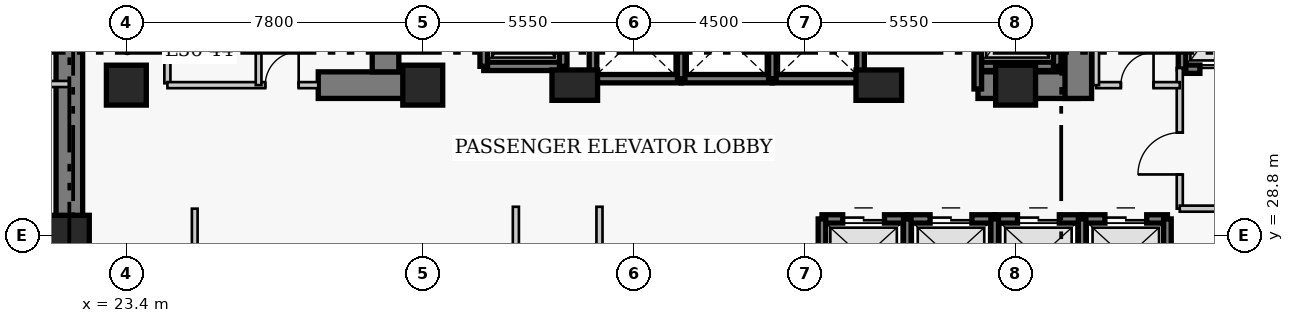
"""IFC4 building model, lengths in metres.
Left out: names, types, materials, properties, quantities, classifications, styles, units other than length and angle.
Written with IfcOpenShell. Run it as: python <this file> out.ifc"""

import sys

from ifc_helpers import new_model, si_unit, direction, frame, frame_2d, origin, origin_2d, place, context, subcontext, project, spatial, rectangle, extrude, element, fill, save


model = new_model("IFC4")
c1 = context("Model", 3, precision=1e-05, world=origin(), true_north=direction((0.0, 1.0)))
c2 = subcontext(c1, "Body", "Model", "MODEL_VIEW")
j1 = project(units=[si_unit("LENGTHUNIT", "METRE"), si_unit("PLANEANGLEUNIT", "RADIAN")], contexts=[c1])
p1 = place(None, origin())
s1 = spatial("IfcSite", under=j1, at=p1, CompositionType="ELEMENT")
p2 = place(p1, origin())
s2 = spatial("IfcBuilding", under=s1, at=p2, CompositionType="ELEMENT")
p3 = place(p2, frame((0.0, 0.0, 146.0)))
s3 = spatial("IfcBuildingStorey", under=s2, at=p3, CompositionType="ELEMENT", Elevation=146.0)
p4 = place(p3, frame((21.9, 27.05, 0.0), z_axis=(0.0, 0.0, 1.0), x_axis=(0.0, 1.0, 0.0)))
e1 = element("IfcWall", 1, at=p4, inside=s3, PredefinedType="SHEAR", context=c2, shape_type="SweptSolid", body=[
    extrude(rectangle(XDim=13.62, YDim=0.7, at=frame_2d((6.81, 0.0))), origin(), (0.0, 0.0, 1.0), 3.8),
])
p5 = place(p3, frame((28.45, 32.75, 0.0), z_axis=(0.0, 0.0, 1.0), x_axis=(1.0, 0.0, 0.0)))
e2 = element("IfcWall", 2, at=p5, inside=s3, PredefinedType="SHEAR", context=c2, shape_type="SweptSolid", body=[
    extrude(rectangle(XDim=2.4, YDim=0.7, at=frame_2d((1.2, 0.0))), origin(), (0.0, 0.0, 1.0), 3.8),
])
p6 = place(p3, frame((45.81, 32.75, 0.0), z_axis=(0.0, 0.0, 1.0), x_axis=(1.0, 0.0, 0.0)))
e3 = element("IfcWall", 3, at=p6, inside=s3, PredefinedType="SHEAR", context=c2, shape_type="SweptSolid", body=[
    extrude(rectangle(XDim=2.64, YDim=0.7, at=frame_2d((1.32, 0.0))), origin(), (0.0, 0.0, 1.0), 3.8),
])
p7 = place(p3, frame((30.22, 33.1, 0.0), z_axis=(0.0, 0.0, 1.0), x_axis=(0.0, 1.0, 0.0)))
e4 = element("IfcWall", 4, at=p7, inside=s3, PredefinedType="SHEAR", context=c2, shape_type="SweptSolid", body=[
    extrude(rectangle(XDim=7.22, YDim=0.7, at=frame_2d((3.61, 0.0))), origin(), (0.0, 0.0, 1.0), 3.8),
])
p8 = place(p3, frame((48.45, 32.4, 0.0), z_axis=(0.0, 0.0, 1.0), x_axis=(0.0, 1.0, 0.0)))
e5 = element("IfcWall", 5, at=p8, inside=s3, PredefinedType="SHEAR", context=c2, shape_type="SweptSolid", body=[
    extrude(rectangle(XDim=7.92, YDim=0.7, at=frame_2d((3.96, 0.0))), origin(), (0.0, 0.0, 1.0), 3.8),
])
p9 = place(p8, frame((5.8, 0.0, 0.0)))
e6 = element("IfcOpeningElement", 6, at=p9, cuts=e5, PredefinedType="OPENING", context=c2, shape_type="SweptSolid", body=[
    extrude(rectangle(XDim=1.1, YDim=2.15, at=frame_2d((0.55, 1.075))), frame((0.0, 0.36, 0.0), z_axis=(0.0, -1.0, 0.0), x_axis=(1.0, 0.0, 0.0)), (0.0, 0.0, 1.0), 0.72),
])
for number, where, z_axis, x_axis in (
    (7, (21.9, 28.8, 0.0), (0.0, 0.0, 1.0), (1.0, 0.0, 0.0)),
    (8, (23.4, 32.75, 0.0), (0.0, 0.0, 1.0), (1.0, 0.0, 0.0)),
    (9, (31.2, 32.75, 0.0), (0.0, 0.0, 1.0), (1.0, 0.0, 0.0)),
):
    element("IfcColumn", number, at=place(p3, frame(where, z_axis=z_axis, x_axis=x_axis)), inside=s3, PredefinedType="COLUMN", context=c2, shape_type="SweptSolid", body=[
        extrude(rectangle(XDim=1.05, YDim=1.05, at=origin_2d()), origin(), (0.0, 0.0, 1.0), 3.8),
    ])
for number, where, z_axis, x_axis in (
    (10, (35.2, 32.75, 0.0), (0.0, 0.0, 1.0), (1.0, 0.0, 0.0)),
    (11, (43.2, 32.75, 0.0), (0.0, 0.0, 1.0), (1.0, 0.0, 0.0)),
):
    element("IfcColumn", number, at=place(p3, frame(where, z_axis=z_axis, x_axis=x_axis)), inside=s3, PredefinedType="COLUMN", context=c2, shape_type="SweptSolid", body=[
        extrude(rectangle(XDim=1.2, YDim=0.8, at=origin_2d()), origin(), (0.0, 0.0, 1.0), 3.8),
    ])
p10 = place(p3, frame((46.8, 32.75, 0.0), z_axis=(0.0, 0.0, 1.0), x_axis=(1.0, 0.0, 0.0)))
e12 = element("IfcColumn", 12, at=p10, inside=s3, PredefinedType="COLUMN", context=c2, shape_type="SweptSolid", body=[
    extrude(rectangle(XDim=1.05, YDim=1.05, at=origin_2d()), origin(), (0.0, 0.0, 1.0), 3.8),
])
p11 = place(p3, frame((41.705, 29.23, 0.0), z_axis=(0.0, 0.0, 1.0), x_axis=(1.0, 0.0, 0.0)))
e13 = element("IfcWall", 13, at=p11, inside=s3, PredefinedType="SHEAR", context=c2, shape_type="SweptSolid", body=[
    extrude(rectangle(XDim=2.245, YDim=0.22, at=frame_2d((1.123, 0.0))), origin(), (0.0, 0.0, 1.0), 3.8),
])
p12 = place(p11, frame((0.545, 0.0, 0.0)))
e14 = element("IfcOpeningElement", 14, at=p12, cuts=e13, PredefinedType="OPENING", context=c2, shape_type="SweptSolid", body=[
    extrude(rectangle(XDim=1.1, YDim=2.15, at=frame_2d((0.55, 1.075))), frame((0.0, 0.12, 0.0), z_axis=(0.0, -1.0, 0.0), x_axis=(1.0, 0.0, 0.0)), (0.0, 0.0, 1.0), 0.24),
])
p13 = place(p3, frame((41.705, 27.17, 0.0), z_axis=(0.0, 0.0, 1.0), x_axis=(0.0, 1.0, 0.0)))
e15 = element("IfcWall", 15, at=p13, inside=s3, PredefinedType="SHEAR", context=c2, shape_type="SweptSolid", body=[
    extrude(rectangle(XDim=2.06, YDim=0.2, at=frame_2d((1.03, 0.0))), origin(), (0.0, 0.0, 1.0), 3.8),
])
p14 = place(p3, frame((43.95, 29.23, 0.0), z_axis=(0.0, 0.0, 1.0), x_axis=(1.0, 0.0, 0.0)))
e16 = element("IfcWall", 16, at=p14, inside=s3, PredefinedType="SHEAR", context=c2, shape_type="SweptSolid", body=[
    extrude(rectangle(XDim=2.3, YDim=0.22, at=frame_2d((1.15, 0.0))), origin(), (0.0, 0.0, 1.0), 3.8),
])
p15 = place(p14, frame((0.6, 0.0, 0.0)))
e17 = element("IfcOpeningElement", 17, at=p15, cuts=e16, PredefinedType="OPENING", context=c2, shape_type="SweptSolid", body=[
    extrude(rectangle(XDim=1.1, YDim=2.15, at=frame_2d((0.55, 1.075))), frame((0.0, 0.12, 0.0), z_axis=(0.0, -1.0, 0.0), x_axis=(1.0, 0.0, 0.0)), (0.0, 0.0, 1.0), 0.24),
])
p16 = place(p3, frame((43.95, 27.17, 0.0), z_axis=(0.0, 0.0, 1.0), x_axis=(0.0, 1.0, 0.0)))
e18 = element("IfcWall", 18, at=p16, inside=s3, PredefinedType="SHEAR", context=c2, shape_type="SweptSolid", body=[
    extrude(rectangle(XDim=2.06, YDim=0.2, at=frame_2d((1.03, 0.0))), origin(), (0.0, 0.0, 1.0), 3.8),
])
p17 = place(p3, frame((46.25, 29.23, 0.0), z_axis=(0.0, 0.0, 1.0), x_axis=(1.0, 0.0, 0.0)))
e19 = element("IfcWall", 19, at=p17, inside=s3, PredefinedType="SHEAR", context=c2, shape_type="SweptSolid", body=[
    extrude(rectangle(XDim=2.3, YDim=0.22, at=frame_2d((1.15, 0.0))), origin(), (0.0, 0.0, 1.0), 3.8),
])
p18 = place(p17, frame((0.6, 0.0, 0.0)))
e20 = element("IfcOpeningElement", 20, at=p18, cuts=e19, PredefinedType="OPENING", context=c2, shape_type="SweptSolid", body=[
    extrude(rectangle(XDim=1.1, YDim=2.15, at=frame_2d((0.55, 1.075))), frame((0.0, 0.12, 0.0), z_axis=(0.0, -1.0, 0.0), x_axis=(1.0, 0.0, 0.0)), (0.0, 0.0, 1.0), 0.24),
])
p19 = place(p3, frame((46.25, 27.17, 0.0), z_axis=(0.0, 0.0, 1.0), x_axis=(0.0, 1.0, 0.0)))
e21 = element("IfcWall", 21, at=p19, inside=s3, PredefinedType="SHEAR", context=c2, shape_type="SweptSolid", body=[
    extrude(rectangle(XDim=2.06, YDim=0.2, at=frame_2d((1.03, 0.0))), origin(), (0.0, 0.0, 1.0), 3.8),
])
p20 = place(p3, frame((48.55, 29.23, 0.0), z_axis=(0.0, 0.0, 1.0), x_axis=(1.0, 0.0, 0.0)))
e22 = element("IfcWall", 22, at=p20, inside=s3, PredefinedType="SHEAR", context=c2, shape_type="SweptSolid", body=[
    extrude(rectangle(XDim=2.245, YDim=0.22, at=frame_2d((1.123, 0.0))), origin(), (0.0, 0.0, 1.0), 3.8),
])
p21 = place(p20, frame((0.6, 0.0, 0.0)))
e23 = element("IfcOpeningElement", 23, at=p21, cuts=e22, PredefinedType="OPENING", context=c2, shape_type="SweptSolid", body=[
    extrude(rectangle(XDim=1.1, YDim=2.15, at=frame_2d((0.55, 1.075))), frame((0.0, 0.12, 0.0), z_axis=(0.0, -1.0, 0.0), x_axis=(1.0, 0.0, 0.0)), (0.0, 0.0, 1.0), 0.24),
])
for number, where, z_axis, x_axis in (
    (24, (48.55, 27.17, 0.0), (0.0, 0.0, 1.0), (0.0, 1.0, 0.0)),
    (25, (50.795, 27.17, 0.0), (0.0, 0.0, 1.0), (0.0, 1.0, 0.0)),
):
    element("IfcWall", number, at=place(p3, frame(where, z_axis=z_axis, x_axis=x_axis)), inside=s3, PredefinedType="SHEAR", context=c2, shape_type="SweptSolid", body=[
        extrude(rectangle(XDim=2.06, YDim=0.2, at=frame_2d((1.03, 0.0))), origin(), (0.0, 0.0, 1.0), 3.8),
    ])
p22 = place(p3, frame((35.68, 32.92, 0.0), z_axis=(0.0, 0.0, 1.0), x_axis=(1.0, 0.0, 0.0)))
e26 = element("IfcWall", 26, at=p22, inside=s3, PredefinedType="SHEAR", context=c2, shape_type="SweptSolid", body=[
    extrude(rectangle(XDim=2.32, YDim=0.22, at=frame_2d((1.16, 0.0))), origin(), (0.0, 0.0, 1.0), 3.8),
])
p23 = place(p3, frame((35.68, 32.92, 0.0), z_axis=(0.0, 0.0, 1.0), x_axis=(0.0, 1.0, 0.0)))
e27 = element("IfcWall", 27, at=p23, inside=s3, PredefinedType="SHEAR", context=c2, shape_type="SweptSolid", body=[
    extrude(rectangle(XDim=2.16, YDim=0.2, at=frame_2d((1.08, 0.0))), origin(), (0.0, 0.0, 1.0), 3.8),
])
p24 = place(p3, frame((38.0, 32.92, 0.0), z_axis=(0.0, 0.0, 1.0), x_axis=(1.0, 0.0, 0.0)))
e28 = element("IfcWall", 28, at=p24, inside=s3, PredefinedType="SHEAR", context=c2, shape_type="SweptSolid", body=[
    extrude(rectangle(XDim=2.4, YDim=0.22, at=frame_2d((1.2, 0.0))), origin(), (0.0, 0.0, 1.0), 3.8),
])
p25 = place(p3, frame((38.0, 32.92, 0.0), z_axis=(0.0, 0.0, 1.0), x_axis=(0.0, 1.0, 0.0)))
e29 = element("IfcWall", 29, at=p25, inside=s3, PredefinedType="SHEAR", context=c2, shape_type="SweptSolid", body=[
    extrude(rectangle(XDim=2.16, YDim=0.2, at=frame_2d((1.08, 0.0))), origin(), (0.0, 0.0, 1.0), 3.8),
])
p26 = place(p3, frame((40.4, 32.92, 0.0), z_axis=(0.0, 0.0, 1.0), x_axis=(1.0, 0.0, 0.0)))
e30 = element("IfcWall", 30, at=p26, inside=s3, PredefinedType="SHEAR", context=c2, shape_type="SweptSolid", body=[
    extrude(rectangle(XDim=2.32, YDim=0.22, at=frame_2d((1.16, 0.0))), origin(), (0.0, 0.0, 1.0), 3.8),
])
for number, where, z_axis, x_axis in (
    (31, (40.4, 32.92, 0.0), (0.0, 0.0, 1.0), (0.0, 1.0, 0.0)),
    (32, (42.72, 32.92, 0.0), (0.0, 0.0, 1.0), (0.0, 1.0, 0.0)),
):
    element("IfcWall", number, at=place(p3, frame(where, z_axis=z_axis, x_axis=x_axis)), inside=s3, PredefinedType="SHEAR", context=c2, shape_type="SweptSolid", body=[
        extrude(rectangle(XDim=2.16, YDim=0.2, at=frame_2d((1.08, 0.0))), origin(), (0.0, 0.0, 1.0), 3.8),
    ])
p27 = place(p3, frame((51.18, 33.17, 0.0), z_axis=(0.0, 0.0, 1.0), x_axis=(1.0, 0.0, 0.0)))
e33 = element("IfcWall", 33, at=p27, inside=s3, PredefinedType="SHEAR", context=c2, shape_type="SweptSolid", body=[
    extrude(rectangle(XDim=2.42, YDim=0.22, at=frame_2d((1.21, 0.0))), origin(), (0.0, 0.0, 1.0), 3.8),
])
p28 = place(p27, frame((0.47, 0.0, 0.0)))
e34 = element("IfcOpeningElement", 34, at=p28, cuts=e33, PredefinedType="OPENING", context=c2, shape_type="SweptSolid", body=[
    extrude(rectangle(XDim=1.3, YDim=2.15, at=frame_2d((0.65, 1.075))), frame((0.0, 0.12, 0.0), z_axis=(0.0, -1.0, 0.0), x_axis=(1.0, 0.0, 0.0)), (0.0, 0.0, 1.0), 0.24),
])
p29 = place(p3, frame((51.18, 33.17, 0.0), z_axis=(0.0, 0.0, 1.0), x_axis=(0.0, 1.0, 0.0)))
e35 = element("IfcWall", 35, at=p29, inside=s3, PredefinedType="SHEAR", context=c2, shape_type="SweptSolid", body=[
    extrude(rectangle(XDim=2.86, YDim=0.2, at=frame_2d((1.43, 0.0))), origin(), (0.0, 0.0, 1.0), 3.8),
])
p30 = place(p3, frame((32.805, 33.245, 0.0), z_axis=(0.0, 0.0, 1.0), x_axis=(1.0, 0.0, 0.0)))
e36 = element("IfcWall", 36, at=p30, inside=s3, PredefinedType="SHEAR", context=c2, shape_type="SweptSolid", body=[
    extrude(rectangle(XDim=2.09, YDim=0.22, at=frame_2d((1.045, 0.0))), origin(), (0.0, 0.0, 1.0), 3.8),
])
for number, where, z_axis, x_axis in (
    (37, (32.805, 33.245, 0.0), (0.0, 0.0, 1.0), (0.0, 1.0, 0.0)),
    (38, (34.895, 33.245, 0.0), (0.0, 0.0, 1.0), (0.0, 1.0, 0.0)),
):
    element("IfcWall", number, at=place(p3, frame(where, z_axis=z_axis, x_axis=x_axis)), inside=s3, PredefinedType="SHEAR", context=c2, shape_type="SweptSolid", body=[
        extrude(rectangle(XDim=2.91, YDim=0.2, at=frame_2d((1.455, 0.0))), origin(), (0.0, 0.0, 1.0), 3.8),
    ])
p31 = place(p3, frame((45.805, 33.245, 0.0), z_axis=(0.0, 0.0, 1.0), x_axis=(1.0, 0.0, 0.0)))
e39 = element("IfcWall", 39, at=p31, inside=s3, PredefinedType="SHEAR", context=c2, shape_type="SweptSolid", body=[
    extrude(rectangle(XDim=2.09, YDim=0.22, at=frame_2d((1.045, 0.0))), origin(), (0.0, 0.0, 1.0), 3.8),
])
p32 = place(p3, frame((45.805, 32.65, 0.0), z_axis=(0.0, 0.0, 1.0), x_axis=(0.0, 1.0, 0.0)))
e40 = element("IfcWall", 40, at=p32, inside=s3, PredefinedType="SHEAR", context=c2, shape_type="SweptSolid", body=[
    extrude(rectangle(XDim=3.505, YDim=0.2, at=frame_2d((1.752, 0.0))), origin(), (0.0, 0.0, 1.0), 3.8),
])
p33 = place(p3, frame((47.895, 33.245, 0.0), z_axis=(0.0, 0.0, 1.0), x_axis=(0.0, 1.0, 0.0)))
e41 = element("IfcWall", 41, at=p33, inside=s3, PredefinedType="SHEAR", context=c2, shape_type="SweptSolid", body=[
    extrude(rectangle(XDim=2.91, YDim=0.2, at=frame_2d((1.455, 0.0))), origin(), (0.0, 0.0, 1.0), 3.8),
])
p34 = place(p3, frame((24.48, 32.8, 0.0), z_axis=(0.0, 0.0, 1.0), x_axis=(0.0, 1.0, 0.0)))
e42 = element("IfcWall", 42, at=p34, inside=s3, PredefinedType="PARTITIONING", context=c2, shape_type="SweptSolid", body=[
    extrude(rectangle(XDim=3.57, YDim=0.16, at=frame_2d((1.785, 0.0))), origin(), (0.0, 0.0, 1.0), 3.55),
])
p35 = place(p34, frame((1.604, 0.0, 0.0)))
e43 = element("IfcOpeningElement", 43, at=p35, cuts=e42, PredefinedType="OPENING", context=c2, shape_type="SweptSolid", body=[
    extrude(rectangle(XDim=0.9, YDim=2.1, at=frame_2d((0.45, 1.05))), frame((0.0, 0.09, 0.0), z_axis=(0.0, -1.0, 0.0), x_axis=(1.0, 0.0, 0.0)), (0.0, 0.0, 1.0), 0.18),
])
p36 = place(p3, frame((51.12, 29.5, 0.0), z_axis=(0.0, 0.0, 1.0), x_axis=(0.0, 1.0, 0.0)))
e44 = element("IfcWall", 44, at=p36, inside=s3, PredefinedType="PARTITIONING", context=c2, shape_type="SweptSolid", body=[
    extrude(rectangle(XDim=3.7, YDim=0.16, at=frame_2d((1.85, 0.0))), origin(), (0.0, 0.0, 1.0), 3.55),
])
p37 = place(p36, frame((0.9, 0.0, 0.0)))
e45 = element("IfcOpeningElement", 45, at=p37, cuts=e44, PredefinedType="OPENING", context=c2, shape_type="SweptSolid", body=[
    extrude(rectangle(XDim=1.1, YDim=2.15, at=frame_2d((0.55, 1.075))), frame((0.0, 0.09, 0.0), z_axis=(0.0, -1.0, 0.0), x_axis=(1.0, 0.0, 0.0)), (0.0, 0.0, 1.0), 0.18),
])
p38 = place(p3, frame((51.12, 29.5, 0.0), z_axis=(0.0, 0.0, 1.0), x_axis=(1.0, 0.0, 0.0)))
e46 = element("IfcWall", 46, at=p38, inside=s3, PredefinedType="PARTITIONING", context=c2, shape_type="SweptSolid", body=[
    extrude(rectangle(XDim=5.63, YDim=0.16, at=frame_2d((2.815, 0.0))), origin(), (0.0, 0.0, 1.0), 3.55),
])
p39 = place(p3, frame((24.48, 32.75, 0.0), z_axis=(0.0, 0.0, 1.0), x_axis=(1.0, 0.0, 0.0)))
e47 = element("IfcWall", 47, at=p39, inside=s3, PredefinedType="PARTITIONING", context=c2, shape_type="SweptSolid", body=[
    extrude(rectangle(XDim=3.97, YDim=0.16, at=frame_2d((1.985, 0.0))), origin(), (0.0, 0.0, 1.0), 3.55),
])
p40 = place(p39, frame((2.575, 0.0, 0.0)))
e48 = element("IfcOpeningElement", 48, at=p40, cuts=e47, PredefinedType="OPENING", context=c2, shape_type="SweptSolid", body=[
    extrude(rectangle(XDim=0.88, YDim=2.05, at=frame_2d((0.44, 1.025))), frame((0.0, 0.09, 0.0), z_axis=(0.0, -1.0, 0.0), x_axis=(1.0, 0.0, 0.0)), (0.0, 0.0, 1.0), 0.18),
])
p41 = place(p3, frame((48.92, 32.75, 0.0), z_axis=(0.0, 0.0, 1.0), x_axis=(1.0, 0.0, 0.0)))
e49 = element("IfcWall", 49, at=p41, inside=s3, PredefinedType="PARTITIONING", context=c2, shape_type="SweptSolid", body=[
    extrude(rectangle(XDim=2.2, YDim=0.16, at=frame_2d((1.1, 0.0))), origin(), (0.0, 0.0, 1.0), 3.55),
])
p42 = place(p41, frame((0.65, 0.0, 0.0)))
e50 = element("IfcOpeningElement", 50, at=p42, cuts=e49, PredefinedType="OPENING", context=c2, shape_type="SweptSolid", body=[
    extrude(rectangle(XDim=0.86, YDim=2.05, at=frame_2d((0.43, 1.025))), frame((0.0, 0.09, 0.0), z_axis=(0.0, -1.0, 0.0), x_axis=(1.0, 0.0, 0.0)), (0.0, 0.0, 1.0), 0.18),
])
for number, where, z_axis, x_axis in (
    (51, (48.92, 32.75, 0.0), (0.0, 0.0, 1.0), (0.0, 1.0, 0.0)),
    (52, (26.88, 32.75, 0.0), (0.0, 0.0, 1.0), (0.0, 1.0, 0.0)),
):
    element("IfcWall", number, at=place(p3, frame(where, z_axis=z_axis, x_axis=x_axis)), inside=s3, PredefinedType="PARTITIONING", context=c2, shape_type="SweptSolid", body=[
        extrude(rectangle(XDim=3.62, YDim=0.15, at=frame_2d((1.81, 0.0))), origin(), (0.0, 0.0, 1.0), 3.55),
    ])
for number, where, z_axis, x_axis in (
    (53, (33.65, 19.01, 0.0), (0.0, 0.0, 1.0), (0.0, 1.0, 0.0)),
    (54, (35.85, 19.01, 0.0), (0.0, 0.0, 1.0), (0.0, 1.0, 0.0)),
):
    element("IfcWall", number, at=place(p3, frame(where, z_axis=z_axis, x_axis=x_axis)), inside=s3, PredefinedType="PARTITIONING", context=c2, shape_type="SweptSolid", body=[
        extrude(rectangle(XDim=10.54, YDim=0.16, at=frame_2d((5.27, 0.0))), origin(), (0.0, 0.0, 1.0), 3.55),
    ])
p43 = place(p3, frame((19.16, 32.78, 0.0), z_axis=(0.0, 0.0, 1.0), x_axis=(1.0, 0.0, 0.0)))
e55 = element("IfcWall", 55, at=p43, inside=s3, PredefinedType="PARTITIONING", context=c2, shape_type="SweptSolid", body=[
    extrude(rectangle(XDim=2.74, YDim=0.16, at=frame_2d((1.37, 0.0))), origin(), (0.0, 0.0, 1.0), 3.55),
])
p44 = place(p3, frame((25.2, 19.01, 0.0), z_axis=(0.0, 0.0, 1.0), x_axis=(0.0, 1.0, 0.0)))
e56 = element("IfcWall", 56, at=p44, inside=s3, PredefinedType="PARTITIONING", context=c2, shape_type="SweptSolid", body=[
    extrude(rectangle(XDim=10.49, YDim=0.15, at=frame_2d((5.245, 0.0))), origin(), (0.0, 0.0, 1.0), 3.55),
])
p45 = place(p12, origin())
e57 = element("IfcDoor", 57, at=p45, inside=s3, OperationType="DOUBLE_DOOR_SLIDING", PredefinedType="DOOR", context=c2, shape_type="SweptSolid", body=[
    extrude(rectangle(XDim=1.1, YDim=2.15, at=frame_2d((0.55, 1.075))), frame((0.0, 0.025, 0.0), z_axis=(0.0, -1.0, 0.0), x_axis=(1.0, 0.0, 0.0)), (0.0, 0.0, 1.0), 0.05),
])
fill(e14, e57)
p46 = place(p15, origin())
e58 = element("IfcDoor", 58, at=p46, inside=s3, OperationType="DOUBLE_DOOR_SLIDING", PredefinedType="DOOR", context=c2, shape_type="SweptSolid", body=[
    extrude(rectangle(XDim=1.1, YDim=2.15, at=frame_2d((0.55, 1.075))), frame((0.0, 0.025, 0.0), z_axis=(0.0, -1.0, 0.0), x_axis=(1.0, 0.0, 0.0)), (0.0, 0.0, 1.0), 0.05),
])
fill(e17, e58)
p47 = place(p18, origin())
e59 = element("IfcDoor", 59, at=p47, inside=s3, OperationType="DOUBLE_DOOR_SLIDING", PredefinedType="DOOR", context=c2, shape_type="SweptSolid", body=[
    extrude(rectangle(XDim=1.1, YDim=2.15, at=frame_2d((0.55, 1.075))), frame((0.0, 0.025, 0.0), z_axis=(0.0, -1.0, 0.0), x_axis=(1.0, 0.0, 0.0)), (0.0, 0.0, 1.0), 0.05),
])
fill(e20, e59)
p48 = place(p21, origin())
e60 = element("IfcDoor", 60, at=p48, inside=s3, OperationType="DOUBLE_DOOR_SLIDING", PredefinedType="DOOR", context=c2, shape_type="SweptSolid", body=[
    extrude(rectangle(XDim=1.1, YDim=2.15, at=frame_2d((0.55, 1.075))), frame((0.0, 0.025, 0.0), z_axis=(0.0, -1.0, 0.0), x_axis=(1.0, 0.0, 0.0)), (0.0, 0.0, 1.0), 0.05),
])
fill(e23, e60)
p49 = place(p28, origin())
e61 = element("IfcDoor", 61, at=p49, inside=s3, OperationType="DOUBLE_DOOR_SLIDING", PredefinedType="DOOR", context=c2, shape_type="SweptSolid", body=[
    extrude(rectangle(XDim=1.3, YDim=2.15, at=frame_2d((0.65, 1.075))), frame((0.0, 0.025, 0.0), z_axis=(0.0, -1.0, 0.0), x_axis=(1.0, 0.0, 0.0)), (0.0, 0.0, 1.0), 0.05),
])
fill(e34, e61)
p50 = place(p37, origin())
e62 = element("IfcDoor", 62, at=p50, inside=s3, OperationType="SINGLE_SWING_LEFT", PredefinedType="DOOR", context=c2, shape_type="SweptSolid", body=[
    extrude(rectangle(XDim=1.1, YDim=2.15, at=frame_2d((0.55, 1.075))), frame((0.0, 0.025, 0.0), z_axis=(0.0, -1.0, 0.0), x_axis=(1.0, 0.0, 0.0)), (0.0, 0.0, 1.0), 0.05),
])
fill(e45, e62)
p51 = place(p40, origin())
e63 = element("IfcDoor", 63, at=p51, inside=s3, OperationType="SINGLE_SWING_RIGHT", PredefinedType="DOOR", context=c2, shape_type="SweptSolid", body=[
    extrude(rectangle(XDim=0.88, YDim=2.05, at=frame_2d((0.44, 1.025))), frame((0.0, 0.025, 0.0), z_axis=(0.0, -1.0, 0.0), x_axis=(1.0, 0.0, 0.0)), (0.0, 0.0, 1.0), 0.05),
])
fill(e48, e63)
p52 = place(p42, origin())
e64 = element("IfcDoor", 64, at=p52, inside=s3, OperationType="SINGLE_SWING_RIGHT", PredefinedType="DOOR", context=c2, shape_type="SweptSolid", body=[
    extrude(rectangle(XDim=0.86, YDim=2.05, at=frame_2d((0.43, 1.025))), frame((0.0, 0.025, 0.0), z_axis=(0.0, -1.0, 0.0), x_axis=(1.0, 0.0, 0.0)), (0.0, 0.0, 1.0), 0.05),
])
fill(e50, e64)
save(model, sys.argv[1])
